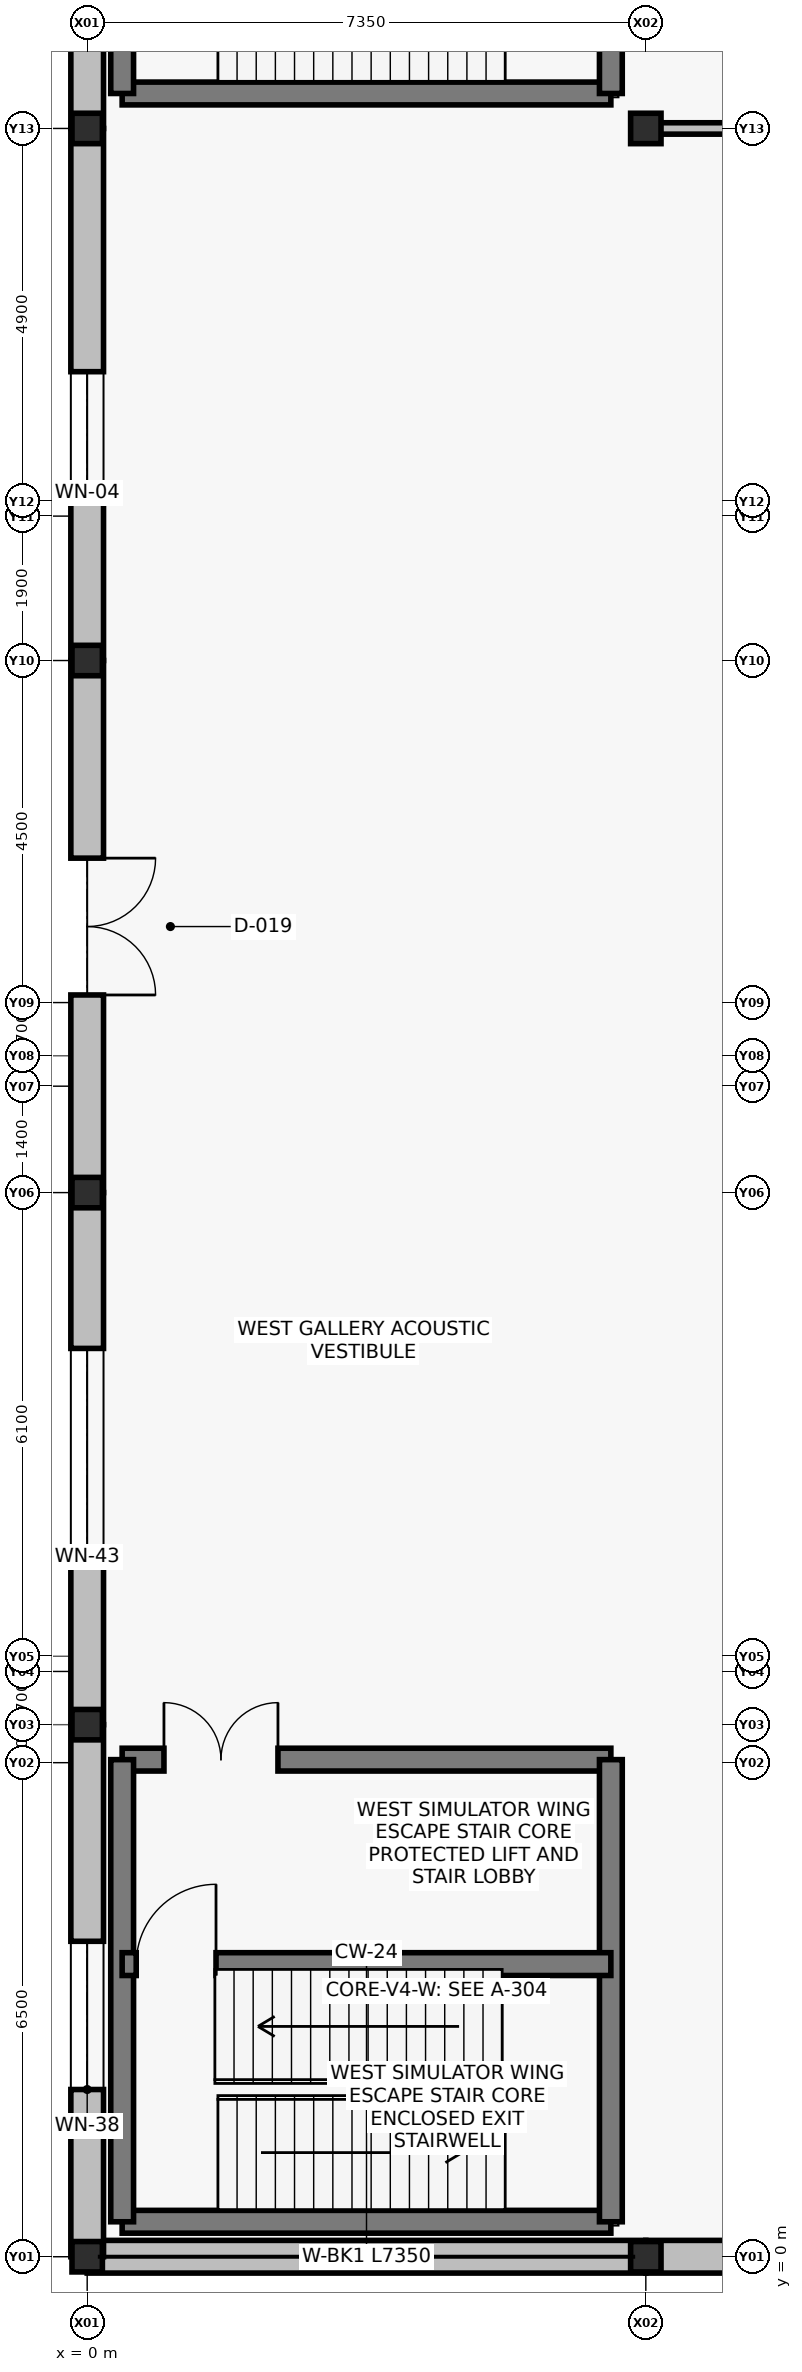
"""IFC4 building model, lengths in metres.
Left out: names, types, materials, properties, quantities, classifications, styles, units other than length and angle.
Written with IfcOpenShell. Run it as: python <this file> out.ifc"""

import sys

from ifc_helpers import new_model, si_unit, direction, frame, frame_2d, origin, origin_with_axes, origin_2d, place, context, subcontext, project, spatial, rectangle, i_section, extrude, element, fill, save


model = new_model("IFC4")
c1 = context("Model", 3, precision=1e-05, world=origin(), true_north=direction((0.0, 1.0)))
c2 = subcontext(c1, "Body", "Model", "MODEL_VIEW")
j1 = project(units=[si_unit("LENGTHUNIT", "METRE"), si_unit("PLANEANGLEUNIT", "RADIAN")], contexts=[c1])
p1 = place(None, origin())
s1 = spatial("IfcSite", under=j1, at=p1, CompositionType="ELEMENT")
p2 = place(p1, origin())
s2 = spatial("IfcBuilding", under=s1, at=p2, CompositionType="ELEMENT")
p3 = place(p2, origin())
s3 = spatial("IfcBuildingStorey", under=s2, at=p3, CompositionType="ELEMENT", Elevation=0.0)
for number, where, z_axis, x_axis in (
    (1, (0.0, 0.0, -0.35), (0.0, 0.0, 1.0), (1.0, 0.0, 0.0)),
    (2, (0.0, 7.0, -0.35), (0.0, 0.0, 1.0), (1.0, 0.0, 0.0)),
    (3, (0.0, 14.0, -0.35), (0.0, 0.0, 1.0), (1.0, 0.0, 0.0)),
    (4, (0.0, 21.0, -0.35), (0.0, 0.0, 1.0), (1.0, 0.0, 0.0)),
    (5, (0.0, 28.0, -0.35), (0.0, 0.0, 1.0), (1.0, 0.0, 0.0)),
    (6, (7.35, 0.0, -0.35), (0.0, 0.0, 1.0), (1.0, 0.0, 0.0)),
    (7, (7.35, 28.0, -0.35), (0.0, 0.0, 1.0), (1.0, 0.0, 0.0)),
):
    element("IfcColumn", number, at=place(p3, frame(where, z_axis=z_axis, x_axis=x_axis)), inside=s3, PredefinedType="COLUMN", context=c2, shape_type="SweptSolid", body=[
        extrude(i_section(OverallWidth=0.4, OverallDepth=0.4, WebThickness=0.013, FlangeThickness=0.021, at=origin_2d()), origin(), (0.0, 0.0, 1.0), 6.35),
    ])
p4 = place(p3, origin_with_axes())
e8 = element("IfcWall", 8, at=p4, inside=s3, PredefinedType="SOLIDWALL", context=c2, shape_type="SweptSolid", body=[
    extrude(rectangle(XDim=7.35, YDim=0.43, at=frame_2d((3.675, 0.0))), origin(), (0.0, 0.0, 1.0), 5.15),
])
p5 = place(p3, frame((7.35, 0.0, 0.0), z_axis=(0.0, 0.0, 1.0), x_axis=(1.0, 0.0, 0.0)))
e9 = element("IfcWall", 9, at=p5, inside=s3, PredefinedType="SOLIDWALL", context=c2, shape_type="SweptSolid", body=[
    extrude(rectangle(XDim=7.35, YDim=0.43, at=frame_2d((3.675, 0.0))), origin(), (0.0, 0.0, 1.0), 5.15),
])
p6 = place(p5, frame((2.75, 0.0, 0.0)))
e10 = element("IfcOpeningElement", 10, at=p6, cuts=e9, PredefinedType="OPENING", context=c2, shape_type="SweptSolid", body=[
    extrude(rectangle(XDim=1.8, YDim=2.4, at=frame_2d((0.9, 1.2))), frame((0.0, 0.225, 0.0), z_axis=(0.0, -1.0, 0.0), x_axis=(1.0, 0.0, 0.0)), (0.0, 0.0, 1.0), 0.45),
])
p7 = place(p3, frame((0.0, 0.0, 0.0), z_axis=(0.0, 0.0, 1.0), x_axis=(0.0, 1.0, 0.0)))
e11 = element("IfcWall", 11, at=p7, inside=s3, PredefinedType="SOLIDWALL", context=c2, shape_type="SweptSolid", body=[
    extrude(rectangle(XDim=7.0, YDim=0.43, at=frame_2d((3.5, 0.0))), origin(), (0.0, 0.0, 1.0), 5.15),
])
p8 = place(p7, frame((2.2, 0.0, 1.0)))
e12 = element("IfcOpeningElement", 12, at=p8, cuts=e11, PredefinedType="OPENING", context=c2, shape_type="SweptSolid", body=[
    extrude(rectangle(XDim=1.95, YDim=1.8, at=frame_2d((0.975, 0.9))), frame((0.0, 0.225, 0.0), z_axis=(0.0, -1.0, 0.0), x_axis=(1.0, 0.0, 0.0)), (0.0, 0.0, 1.0), 0.45),
])
p9 = place(p3, frame((0.0, 7.0, 0.0), z_axis=(0.0, 0.0, 1.0), x_axis=(0.0, 1.0, 0.0)))
e13 = element("IfcWall", 13, at=p9, inside=s3, PredefinedType="SOLIDWALL", context=c2, shape_type="SweptSolid", body=[
    extrude(rectangle(XDim=7.0, YDim=0.43, at=frame_2d((3.5, 0.0))), origin(), (0.0, 0.0, 1.0), 5.15),
])
p10 = place(p9, frame((2.2, 0.0, 1.0)))
e14 = element("IfcOpeningElement", 14, at=p10, cuts=e13, PredefinedType="OPENING", context=c2, shape_type="SweptSolid", body=[
    extrude(rectangle(XDim=2.75, YDim=2.05, at=frame_2d((1.375, 1.025))), frame((0.0, 0.225, 0.0), z_axis=(0.0, -1.0, 0.0), x_axis=(1.0, 0.0, 0.0)), (0.0, 0.0, 1.0), 0.45),
])
p11 = place(p3, frame((0.0, 14.0, 0.0), z_axis=(0.0, 0.0, 1.0), x_axis=(0.0, 1.0, 0.0)))
e15 = element("IfcWall", 15, at=p11, inside=s3, PredefinedType="SOLIDWALL", context=c2, shape_type="SweptSolid", body=[
    extrude(rectangle(XDim=7.0, YDim=0.43, at=frame_2d((3.5, 0.0))), origin(), (0.0, 0.0, 1.0), 5.15),
])
p12 = place(p11, frame((2.6, 0.0, 0.0)))
e16 = element("IfcOpeningElement", 16, at=p12, cuts=e15, PredefinedType="OPENING", context=c2, shape_type="SweptSolid", body=[
    extrude(rectangle(XDim=1.8, YDim=2.4, at=frame_2d((0.9, 1.2))), frame((0.0, 0.225, 0.0), z_axis=(0.0, -1.0, 0.0), x_axis=(1.0, 0.0, 0.0)), (0.0, 0.0, 1.0), 0.45),
])
p13 = place(p3, frame((0.0, 21.0, 0.0), z_axis=(0.0, 0.0, 1.0), x_axis=(0.0, 1.0, 0.0)))
e17 = element("IfcWall", 17, at=p13, inside=s3, PredefinedType="SOLIDWALL", context=c2, shape_type="SweptSolid", body=[
    extrude(rectangle(XDim=7.0, YDim=0.43, at=frame_2d((3.5, 0.0))), origin(), (0.0, 0.0, 1.0), 5.15),
])
p14 = place(p13, frame((2.2, 0.0, 1.0)))
e18 = element("IfcOpeningElement", 18, at=p14, cuts=e17, PredefinedType="OPENING", context=c2, shape_type="SweptSolid", body=[
    extrude(rectangle(XDim=1.6, YDim=1.8, at=frame_2d((0.8, 0.9))), frame((0.0, 0.225, 0.0), z_axis=(0.0, -1.0, 0.0), x_axis=(1.0, 0.0, 0.0)), (0.0, 0.0, 1.0), 0.45),
])
p15 = place(p3, frame((0.0, 28.0, 0.0), z_axis=(0.0, 0.0, 1.0), x_axis=(0.0, 1.0, 0.0)))
e19 = element("IfcWall", 19, at=p15, inside=s3, PredefinedType="SOLIDWALL", context=c2, shape_type="SweptSolid", body=[
    extrude(rectangle(XDim=7.0, YDim=0.43, at=frame_2d((3.5, 0.0))), origin(), (0.0, 0.0, 1.0), 5.15),
])
p16 = place(p15, frame((2.2, 0.0, 1.0)))
e20 = element("IfcOpeningElement", 20, at=p16, cuts=e19, PredefinedType="OPENING", context=c2, shape_type="SweptSolid", body=[
    extrude(rectangle(XDim=2.4, YDim=1.8, at=frame_2d((1.2, 0.9))), frame((0.0, 0.225, 0.0), z_axis=(0.0, -1.0, 0.0), x_axis=(1.0, 0.0, 0.0)), (0.0, 0.0, 1.0), 0.45),
])
p17 = place(p3, frame((0.46, 28.46, -0.35), z_axis=(0.0, 0.0, 1.0), x_axis=(1.0, 0.0, 0.0)))
e21 = element("IfcWall", 21, at=p17, inside=s3, PredefinedType="SHEAR", context=c2, shape_type="SweptSolid", body=[
    extrude(rectangle(XDim=6.43, YDim=0.3, at=frame_2d((3.215, 0.0))), origin(), (0.0, 0.0, 1.0), 6.07),
])
for number, where, z_axis, x_axis in (
    (22, (0.46, 28.46, -0.35), (0.0, 0.0, 1.0), (0.0, 1.0, 0.0)),
    (23, (6.89, 28.46, -0.35), (0.0, 0.0, 1.0), (0.0, 1.0, 0.0)),
):
    element("IfcWall", number, at=place(p3, frame(where, z_axis=z_axis, x_axis=x_axis)), inside=s3, PredefinedType="SHEAR", context=c2, shape_type="SweptSolid", body=[
        extrude(rectangle(XDim=6.08, YDim=0.3, at=frame_2d((3.04, 0.0))), origin(), (0.0, 0.0, 1.0), 6.07),
    ])
p18 = place(p3, frame((0.46, 0.46, -0.35), z_axis=(0.0, 0.0, 1.0), x_axis=(1.0, 0.0, 0.0)))
e24 = element("IfcWall", 24, at=p18, inside=s3, PredefinedType="SHEAR", context=c2, shape_type="SweptSolid", body=[
    extrude(rectangle(XDim=6.43, YDim=0.3, at=frame_2d((3.215, 0.0))), origin(), (0.0, 0.0, 1.0), 6.07),
])
p19 = place(p3, frame((0.46, 6.54, -0.35), z_axis=(0.0, 0.0, 1.0), x_axis=(1.0, 0.0, 0.0)))
e25 = element("IfcWall", 25, at=p19, inside=s3, PredefinedType="SHEAR", context=c2, shape_type="SweptSolid", body=[
    extrude(rectangle(XDim=6.43, YDim=0.3, at=frame_2d((3.215, 0.0))), origin(), (0.0, 0.0, 1.0), 6.07),
])
p20 = place(p19, frame((0.55, 0.0, 0.35)))
e26 = element("IfcOpeningElement", 26, at=p20, cuts=e25, PredefinedType="OPENING", context=c2, shape_type="SweptSolid", body=[
    extrude(rectangle(XDim=1.5, YDim=2.2, at=frame_2d((0.75, 1.1))), frame((0.0, 0.16, 0.0), z_axis=(0.0, -1.0, 0.0), x_axis=(1.0, 0.0, 0.0)), (0.0, 0.0, 1.0), 0.32),
])
for number, where, z_axis, x_axis in (
    (27, (0.46, 0.46, -0.35), (0.0, 0.0, 1.0), (0.0, 1.0, 0.0)),
    (28, (6.89, 0.46, -0.35), (0.0, 0.0, 1.0), (0.0, 1.0, 0.0)),
):
    element("IfcWall", number, at=place(p3, frame(where, z_axis=z_axis, x_axis=x_axis)), inside=s3, PredefinedType="SHEAR", context=c2, shape_type="SweptSolid", body=[
        extrude(rectangle(XDim=6.08, YDim=0.3, at=frame_2d((3.04, 0.0))), origin(), (0.0, 0.0, 1.0), 6.07),
    ])
p21 = place(p3, frame((0.46, 3.85, -0.35), z_axis=(0.0, 0.0, 1.0), x_axis=(1.0, 0.0, 0.0)))
e29 = element("IfcWall", 29, at=p21, inside=s3, PredefinedType="SHEAR", context=c2, shape_type="SweptSolid", body=[
    extrude(rectangle(XDim=6.43, YDim=0.3, at=frame_2d((3.215, 0.0))), origin(), (0.0, 0.0, 1.0), 6.07),
])
p22 = place(p21, frame((0.185, 0.0, 0.35)))
e30 = element("IfcOpeningElement", 30, at=p22, cuts=e29, PredefinedType="OPENING", context=c2, shape_type="SweptSolid", body=[
    extrude(rectangle(XDim=1.05, YDim=2.15, at=frame_2d((0.525, 1.075))), frame((0.0, 0.16, 0.0), z_axis=(0.0, -1.0, 0.0), x_axis=(1.0, 0.0, 0.0)), (0.0, 0.0, 1.0), 0.32),
])
p23 = place(p3, frame((7.35, 28.0, 0.0), z_axis=(0.0, 0.0, 1.0), x_axis=(1.0, 0.0, 0.0)))
e31 = element("IfcWall", 31, at=p23, inside=s3, PredefinedType="PARTITIONING", context=c2, shape_type="SweptSolid", body=[
    extrude(rectangle(XDim=22.05, YDim=0.15, at=frame_2d((11.025, 0.0))), origin(), (0.0, 0.0, 1.0), 4.35),
])
p24 = place(p23, frame((10.2, 0.0, 0.0)))
e32 = element("IfcOpeningElement", 32, at=p24, cuts=e31, PredefinedType="OPENING", context=c2, shape_type="SweptSolid", body=[
    extrude(rectangle(XDim=1.7, YDim=2.25, at=frame_2d((0.85, 1.125))), frame((0.0, 0.085, 0.0), z_axis=(0.0, -1.0, 0.0), x_axis=(1.0, 0.0, 0.0)), (0.0, 0.0, 1.0), 0.17),
])
p25 = place(p8, origin())
e33 = element("IfcWindow", 33, at=p25, inside=s3, PartitioningType="SINGLE_PANEL", PredefinedType="WINDOW", context=c2, shape_type="SweptSolid", body=[
    extrude(rectangle(XDim=1.95, YDim=1.8, at=frame_2d((0.975, 0.9))), frame((0.0, 0.03, 0.0), z_axis=(0.0, -1.0, 0.0), x_axis=(1.0, 0.0, 0.0)), (0.0, 0.0, 1.0), 0.06),
])
fill(e12, e33)
p26 = place(p10, origin())
e34 = element("IfcWindow", 34, at=p26, inside=s3, PartitioningType="SINGLE_PANEL", PredefinedType="WINDOW", context=c2, shape_type="SweptSolid", body=[
    extrude(rectangle(XDim=2.75, YDim=2.05, at=frame_2d((1.375, 1.025))), frame((0.0, 0.03, 0.0), z_axis=(0.0, -1.0, 0.0), x_axis=(1.0, 0.0, 0.0)), (0.0, 0.0, 1.0), 0.06),
])
fill(e14, e34)
p27 = place(p12, origin())
e35 = element("IfcDoor", 35, at=p27, inside=s3, OperationType="DOUBLE_DOOR_SINGLE_SWING", PredefinedType="DOOR", context=c2, shape_type="SweptSolid", body=[
    extrude(rectangle(XDim=1.8, YDim=2.4, at=frame_2d((0.9, 1.2))), frame((0.0, 0.025, 0.0), z_axis=(0.0, -1.0, 0.0), x_axis=(1.0, 0.0, 0.0)), (0.0, 0.0, 1.0), 0.05),
])
fill(e16, e35)
p28 = place(p14, origin())
e36 = element("IfcWindow", 36, at=p28, inside=s3, PartitioningType="SINGLE_PANEL", PredefinedType="WINDOW", context=c2, shape_type="SweptSolid", body=[
    extrude(rectangle(XDim=1.6, YDim=1.8, at=frame_2d((0.8, 0.9))), frame((0.0, 0.03, 0.0), z_axis=(0.0, -1.0, 0.0), x_axis=(1.0, 0.0, 0.0)), (0.0, 0.0, 1.0), 0.06),
])
fill(e18, e36)
p29 = place(p22, origin())
e37 = element("IfcDoor", 37, at=p29, inside=s3, OperationType="SINGLE_SWING_RIGHT", PredefinedType="DOOR", context=c2, shape_type="SweptSolid", body=[
    extrude(rectangle(XDim=1.05, YDim=2.15, at=frame_2d((0.525, 1.075))), frame((0.0, 0.025, 0.0), z_axis=(0.0, -1.0, 0.0), x_axis=(1.0, 0.0, 0.0)), (0.0, 0.0, 1.0), 0.05),
])
fill(e30, e37)
p30 = place(p20, origin())
e38 = element("IfcDoor", 38, at=p30, inside=s3, OperationType="DOUBLE_DOOR_SINGLE_SWING", PredefinedType="DOOR", context=c2, shape_type="SweptSolid", body=[
    extrude(rectangle(XDim=1.5, YDim=2.2, at=frame_2d((0.75, 1.1))), frame((0.0, 0.025, 0.0), z_axis=(0.0, -1.0, 0.0), x_axis=(1.0, 0.0, 0.0)), (0.0, 0.0, 1.0), 0.05),
])
fill(e26, e38)
save(model, sys.argv[1])
